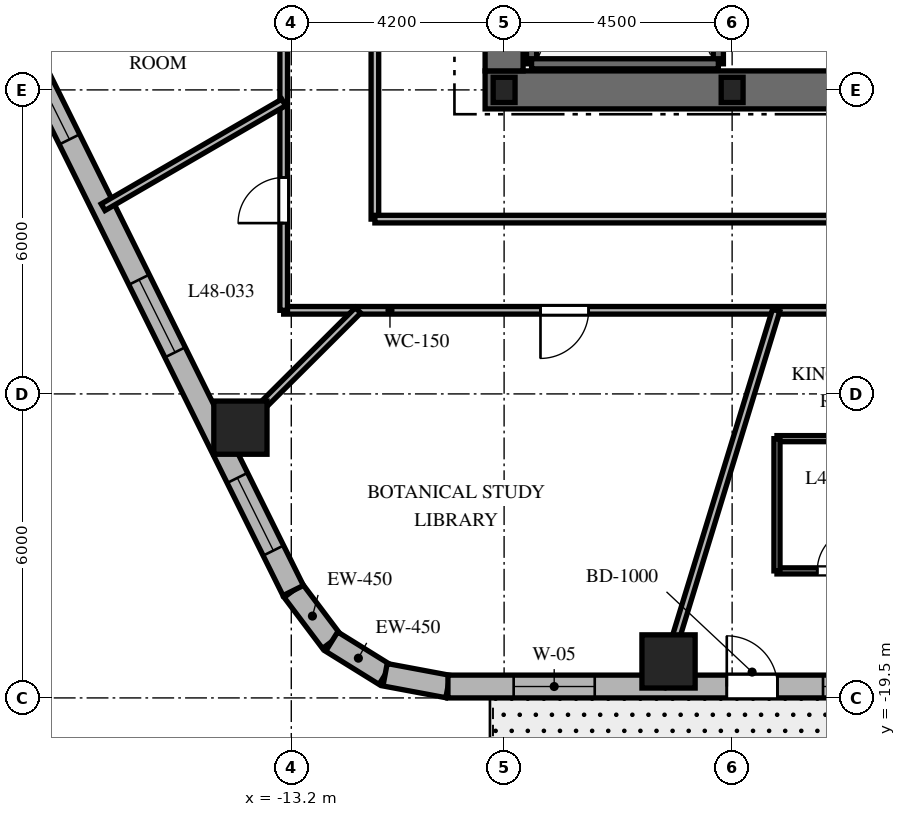
"""IFC4 building model, lengths in metres.
Left out: names, types, materials, properties, quantities, classifications, styles, units other than length and angle.
Written with IfcOpenShell. Run it as: python <this file> out.ifc"""

import sys

from ifc_helpers import new_model, si_unit, direction, frame, frame_2d, origin, origin_2d, place, context, subcontext, project, spatial, rectangle, i_section, extrude, element, fill, save


model = new_model("IFC4")
c1 = context("Model", 3, precision=1e-05, world=origin(), true_north=direction((0.0, 1.0)))
c2 = subcontext(c1, "Body", "Model", "MODEL_VIEW")
j1 = project(units=[si_unit("LENGTHUNIT", "METRE"), si_unit("PLANEANGLEUNIT", "RADIAN")], contexts=[c1])
p1 = place(None, origin())
s1 = spatial("IfcSite", under=j1, at=p1, CompositionType="ELEMENT")
p2 = place(p1, origin())
s2 = spatial("IfcBuilding", under=s1, at=p2, CompositionType="ELEMENT")
p3 = place(p2, frame((0.0, 0.0, 194.1)))
s3 = spatial("IfcBuildingStorey", under=s2, at=p3, CompositionType="ELEMENT", Elevation=194.1)
p4 = place(p3, frame((-9.375, -7.5, 0.0), z_axis=(0.0, 0.0, 1.0), x_axis=(1.0, 0.0, 0.0)))
e1 = element("IfcWall", 1, at=p4, inside=s3, PredefinedType="SHEAR", context=c2, shape_type="SweptSolid", body=[
    extrude(rectangle(XDim=18.75, YDim=0.75, at=frame_2d((9.375, 0.0))), origin(), (0.0, 0.0, 1.0), 3.7),
])
p5 = place(p4, frame((9.425, 0.0, 0.0)))
e2 = element("IfcOpeningElement", 2, at=p5, cuts=e1, PredefinedType="OPENING", context=c2, shape_type="SweptSolid", body=[
    extrude(rectangle(XDim=1.0, YDim=2.15, at=frame_2d((0.5, 1.075))), frame((0.0, 0.385, 0.0), z_axis=(0.0, -1.0, 0.0), x_axis=(1.0, 0.0, 0.0)), (0.0, 0.0, 1.0), 0.77),
])
p6 = place(p3, frame((-9.0, -7.125, 0.0), z_axis=(0.0, 0.0, 1.0), x_axis=(0.0, 1.0, 0.0)))
e3 = element("IfcWall", 3, at=p6, inside=s3, PredefinedType="SHEAR", context=c2, shape_type="SweptSolid", body=[
    extrude(rectangle(XDim=14.25, YDim=0.75, at=frame_2d((7.125, 0.0))), origin(), (0.0, 0.0, 1.0), 3.7),
])
p7 = place(p6, frame((10.25, 0.0, 0.0)))
e4 = element("IfcOpeningElement", 4, at=p7, cuts=e3, PredefinedType="OPENING", context=c2, shape_type="SweptSolid", body=[
    extrude(rectangle(XDim=1.05, YDim=2.15, at=frame_2d((0.525, 1.075))), frame((0.0, 0.385, 0.0), z_axis=(0.0, -1.0, 0.0), x_axis=(1.0, 0.0, 0.0)), (0.0, 0.0, 1.0), 0.77),
])
for number, where, z_axis, x_axis in (
    (5, (-8.458, -6.985, 0.0), (0.0, 0.0, 1.0), (0.0, 1.0, 0.0)),
    (6, (-4.772, -6.985, 0.0), (0.0, 0.0, 1.0), (0.0, 1.0, 0.0)),
):
    element("IfcWall", number, at=place(p3, frame(where, z_axis=z_axis, x_axis=x_axis)), inside=s3, PredefinedType="SHEAR", context=c2, shape_type="SweptSolid", body=[
        extrude(rectangle(XDim=9.143, YDim=0.2, at=frame_2d((4.572, 0.0))), origin(), (0.0, 0.0, 1.0), 3.7),
    ])
p8 = place(p3, frame((-8.458, -6.985, 0.0), z_axis=(0.0, 0.0, 1.0), x_axis=(1.0, 0.0, 0.0)))
e7 = element("IfcWall", 7, at=p8, inside=s3, PredefinedType="SHEAR", context=c2, shape_type="SweptSolid", body=[
    extrude(rectangle(XDim=3.686, YDim=0.2, at=frame_2d((1.843, 0.0))), origin(), (0.0, 0.0, 1.0), 3.7),
])
for number, where, z_axis, x_axis in (
    (8, (-9.0, -7.5, 0.0), (0.0, 0.0, 1.0), (1.0, 0.0, 0.0)),
    (9, (-4.5, -7.5, 0.0), (0.0, 0.0, 1.0), (1.0, 0.0, 0.0)),
):
    element("IfcColumn", number, at=place(p3, frame(where, z_axis=z_axis, x_axis=x_axis)), inside=s3, PredefinedType="COLUMN", context=c2, shape_type="SweptSolid", body=[
        extrude(i_section(OverallWidth=0.432, OverallDepth=0.498, WebThickness=0.056, FlangeThickness=0.089, at=origin_2d()), origin(), (0.0, 0.0, 1.0), 3.7),
    ])
for number, where, z_axis, x_axis in (
    (10, (-5.755, -18.78, 0.0), (0.0, 0.0, 1.0), (1.0, 0.0, 0.0)),
    (11, (-14.204, -14.166, 0.0), (0.0, 0.0, 1.0), (1.0, 0.0, 0.0)),
):
    element("IfcColumn", number, at=place(p3, frame(where, z_axis=z_axis, x_axis=x_axis)), inside=s3, PredefinedType="COLUMN", context=c2, shape_type="SweptSolid", body=[
        extrude(rectangle(XDim=1.05, YDim=1.05, at=origin_2d()), origin(), (0.0, 0.0, 1.0), 3.7),
    ])
p9 = place(p3, frame((-13.162, -17.381, 0.0), z_axis=(0.0, 0.0, 1.0), x_axis=(0.601515770517, -0.798860925205, 0.0)))
e12 = element("IfcWall", 12, at=p9, inside=s3, PredefinedType="SOLIDWALL", context=c2, shape_type="SweptSolid", body=[
    extrude(rectangle(XDim=1.262, YDim=0.45, at=frame_2d((0.631, 0.0))), origin(), (0.0, 0.0, 1.0), 3.4),
])
p10 = place(p3, frame((-12.403, -18.389, 0.0), z_axis=(0.0, 0.0, 1.0), x_axis=(0.849795170926, -0.527113049991, 0.0)))
e13 = element("IfcWall", 13, at=p10, inside=s3, PredefinedType="SOLIDWALL", context=c2, shape_type="SweptSolid", body=[
    extrude(rectangle(XDim=1.241, YDim=0.45, at=frame_2d((0.62, 0.0))), origin(), (0.0, 0.0, 1.0), 3.4),
])
p11 = place(p3, frame((-11.349, -19.043, 0.0), z_axis=(0.0, 0.0, 1.0), x_axis=(0.982931267051, -0.183973161772, 0.0)))
e14 = element("IfcWall", 14, at=p11, inside=s3, PredefinedType="SOLIDWALL", context=c2, shape_type="SweptSolid", body=[
    extrude(rectangle(XDim=1.262, YDim=0.45, at=frame_2d((0.631, 0.0))), origin(), (0.0, 0.0, 1.0), 3.4),
])
p12 = place(p3, frame((-10.108, -19.275, 0.0), z_axis=(0.0, 0.0, 1.0), x_axis=(1.0, 0.0, 0.0)))
e15 = element("IfcWall", 15, at=p12, inside=s3, PredefinedType="SOLIDWALL", context=c2, shape_type="SweptSolid", body=[
    extrude(rectangle(XDim=21.829, YDim=0.45, at=frame_2d((10.915, 0.0))), origin(), (0.0, 0.0, 1.0), 3.4),
])
p13 = place(p12, frame((5.503, 0.0, 0.0)))
e16 = element("IfcOpeningElement", 16, at=p13, cuts=e15, PredefinedType="OPENING", context=c2, shape_type="SweptSolid", body=[
    extrude(rectangle(XDim=1.0, YDim=2.15, at=frame_2d((0.5, 1.075))), frame((0.0, 0.235, 0.0), z_axis=(0.0, -1.0, 0.0), x_axis=(1.0, 0.0, 0.0)), (0.0, 0.0, 1.0), 0.47),
])
p14 = place(p12, frame((1.297, 0.0, 0.8)))
e17 = element("IfcOpeningElement", 17, at=p14, cuts=e15, PredefinedType="OPENING", context=c2, shape_type="SweptSolid", body=[
    extrude(rectangle(XDim=1.6, YDim=1.75, at=frame_2d((0.8, 0.875))), frame((0.0, 0.235, 0.0), z_axis=(0.0, -1.0, 0.0), x_axis=(1.0, 0.0, 0.0)), (0.0, 0.0, 1.0), 0.47),
])
p15 = place(p12, frame((7.402, 0.0, 0.8)))
e18 = element("IfcOpeningElement", 18, at=p15, cuts=e15, PredefinedType="OPENING", context=c2, shape_type="SweptSolid", body=[
    extrude(rectangle(XDim=1.6, YDim=1.75, at=frame_2d((0.8, 0.875))), frame((0.0, 0.235, 0.0), z_axis=(0.0, -1.0, 0.0), x_axis=(1.0, 0.0, 0.0)), (0.0, 0.0, 1.0), 0.47),
])
p16 = place(p12, frame((12.684, 0.0, 0.8)))
e19 = element("IfcOpeningElement", 19, at=p16, cuts=e15, PredefinedType="OPENING", context=c2, shape_type="SweptSolid", body=[
    extrude(rectangle(XDim=1.6, YDim=1.75, at=frame_2d((0.8, 0.875))), frame((0.0, 0.235, 0.0), z_axis=(0.0, -1.0, 0.0), x_axis=(1.0, 0.0, 0.0)), (0.0, 0.0, 1.0), 0.47),
])
p17 = place(p12, frame((18.933, 0.0, 0.8)))
e20 = element("IfcOpeningElement", 20, at=p17, cuts=e15, PredefinedType="OPENING", context=c2, shape_type="SweptSolid", body=[
    extrude(rectangle(XDim=1.6, YDim=1.75, at=frame_2d((0.8, 0.875))), frame((0.0, 0.235, 0.0), z_axis=(0.0, -1.0, 0.0), x_axis=(1.0, 0.0, 0.0)), (0.0, 0.0, 1.0), 0.47),
])
p18 = place(p3, frame((-20.618, -2.344, 0.0), z_axis=(0.0, 0.0, 1.0), x_axis=(0.444243691097, -0.895905990002, 0.0)))
e21 = element("IfcWall", 21, at=p18, inside=s3, PredefinedType="SOLIDWALL", context=c2, shape_type="SweptSolid", body=[
    extrude(rectangle(XDim=16.784, YDim=0.45, at=frame_2d((8.392, 0.0))), origin(), (0.0, 0.0, 1.0), 3.4),
])
p19 = place(p18, frame((0.931, 0.0, 0.8)))
e22 = element("IfcOpeningElement", 22, at=p19, cuts=e21, PredefinedType="OPENING", context=c2, shape_type="SweptSolid", body=[
    extrude(rectangle(XDim=1.6, YDim=1.75, at=frame_2d((0.8, 0.875))), frame((0.0, 0.235, 0.0), z_axis=(0.0, -1.0, 0.0), x_axis=(1.0, 0.0, 0.0)), (0.0, 0.0, 1.0), 0.47),
])
p20 = place(p18, frame((5.245, 0.0, 0.8)))
e23 = element("IfcOpeningElement", 23, at=p20, cuts=e21, PredefinedType="OPENING", context=c2, shape_type="SweptSolid", body=[
    extrude(rectangle(XDim=1.6, YDim=1.75, at=frame_2d((0.8, 0.875))), frame((0.0, 0.235, 0.0), z_axis=(0.0, -1.0, 0.0), x_axis=(1.0, 0.0, 0.0)), (0.0, 0.0, 1.0), 0.47),
])
p21 = place(p18, frame((9.936, 0.0, 0.8)))
e24 = element("IfcOpeningElement", 24, at=p21, cuts=e21, PredefinedType="OPENING", context=c2, shape_type="SweptSolid", body=[
    extrude(rectangle(XDim=1.6, YDim=1.75, at=frame_2d((0.8, 0.875))), frame((0.0, 0.235, 0.0), z_axis=(0.0, -1.0, 0.0), x_axis=(1.0, 0.0, 0.0)), (0.0, 0.0, 1.0), 0.47),
])
p22 = place(p18, frame((14.303, 0.0, 0.8)))
e25 = element("IfcOpeningElement", 25, at=p22, cuts=e21, PredefinedType="OPENING", context=c2, shape_type="SweptSolid", body=[
    extrude(rectangle(XDim=1.6, YDim=1.75, at=frame_2d((0.8, 0.875))), frame((0.0, 0.235, 0.0), z_axis=(0.0, -1.0, 0.0), x_axis=(1.0, 0.0, 0.0)), (0.0, 0.0, 1.0), 0.47),
])
p23 = place(p3, frame((13.35, -11.85, 0.0), z_axis=(0.0, 0.0, 1.0), x_axis=(-1.0, 0.0, 0.0)))
e26 = element("IfcWall", 26, at=p23, inside=s3, PredefinedType="PARTITIONING", context=c2, shape_type="SweptSolid", body=[
    extrude(rectangle(XDim=26.7, YDim=0.15, at=frame_2d((13.35, 0.0))), origin(), (0.0, 0.0, 1.0), 2.84),
])
p24 = place(p23, frame((20.682, 0.0, 0.0)))
e27 = element("IfcOpeningElement", 27, at=p24, cuts=e26, PredefinedType="OPENING", context=c2, shape_type="SweptSolid", body=[
    extrude(rectangle(XDim=0.95, YDim=2.03, at=frame_2d((0.475, 1.015))), frame((0.0, 0.085, 0.0), z_axis=(0.0, -1.0, 0.0), x_axis=(1.0, 0.0, 0.0)), (0.0, 0.0, 1.0), 0.17),
])
p25 = place(p23, frame((14.708, 0.0, 0.0)))
e28 = element("IfcOpeningElement", 28, at=p25, cuts=e26, PredefinedType="OPENING", context=c2, shape_type="SweptSolid", body=[
    extrude(rectangle(XDim=0.95, YDim=2.03, at=frame_2d((0.475, 1.015))), frame((0.0, 0.085, 0.0), z_axis=(0.0, -1.0, 0.0), x_axis=(1.0, 0.0, 0.0)), (0.0, 0.0, 1.0), 0.17),
])
p26 = place(p23, frame((10.553, 0.0, 0.0)))
e29 = element("IfcOpeningElement", 29, at=p26, cuts=e26, PredefinedType="OPENING", context=c2, shape_type="SweptSolid", body=[
    extrude(rectangle(XDim=0.95, YDim=2.03, at=frame_2d((0.475, 1.015))), frame((0.0, 0.085, 0.0), z_axis=(0.0, -1.0, 0.0), x_axis=(1.0, 0.0, 0.0)), (0.0, 0.0, 1.0), 0.17),
])
p27 = place(p23, frame((3.97, 0.0, 0.0)))
e30 = element("IfcOpeningElement", 30, at=p27, cuts=e26, PredefinedType="OPENING", context=c2, shape_type="SweptSolid", body=[
    extrude(rectangle(XDim=1.0, YDim=2.03, at=frame_2d((0.5, 1.015))), frame((0.0, 0.085, 0.0), z_axis=(0.0, -1.0, 0.0), x_axis=(1.0, 0.0, 0.0)), (0.0, 0.0, 1.0), 0.17),
])
p28 = place(p3, frame((-13.35, -11.85, 0.0), z_axis=(0.0, 0.0, 1.0), x_axis=(0.0, 1.0, 0.0)))
e31 = element("IfcWall", 31, at=p28, inside=s3, PredefinedType="PARTITIONING", context=c2, shape_type="SweptSolid", body=[
    extrude(rectangle(XDim=23.7, YDim=0.15, at=frame_2d((11.85, 0.0))), origin(), (0.0, 0.0, 1.0), 2.84),
])
p29 = place(p28, frame((20.136, 0.0, 0.0)))
e32 = element("IfcOpeningElement", 32, at=p29, cuts=e31, PredefinedType="OPENING", context=c2, shape_type="SweptSolid", body=[
    extrude(rectangle(XDim=0.9, YDim=2.03, at=frame_2d((0.45, 1.015))), frame((0.0, 0.085, 0.0), z_axis=(0.0, -1.0, 0.0), x_axis=(1.0, 0.0, 0.0)), (0.0, 0.0, 1.0), 0.17),
])
p30 = place(p28, frame((15.551, 0.0, 0.0)))
e33 = element("IfcOpeningElement", 33, at=p30, cuts=e31, PredefinedType="OPENING", context=c2, shape_type="SweptSolid", body=[
    extrude(rectangle(XDim=0.9, YDim=2.03, at=frame_2d((0.45, 1.015))), frame((0.0, 0.085, 0.0), z_axis=(0.0, -1.0, 0.0), x_axis=(1.0, 0.0, 0.0)), (0.0, 0.0, 1.0), 0.17),
])
p31 = place(p28, frame((10.751, 0.0, 0.0)))
e34 = element("IfcOpeningElement", 34, at=p31, cuts=e31, PredefinedType="OPENING", context=c2, shape_type="SweptSolid", body=[
    extrude(rectangle(XDim=0.95, YDim=2.03, at=frame_2d((0.475, 1.015))), frame((0.0, 0.085, 0.0), z_axis=(0.0, -1.0, 0.0), x_axis=(1.0, 0.0, 0.0)), (0.0, 0.0, 1.0), 0.17),
])
p32 = place(p28, frame((5.677, 0.0, 0.0)))
e35 = element("IfcOpeningElement", 35, at=p32, cuts=e31, PredefinedType="OPENING", context=c2, shape_type="SweptSolid", body=[
    extrude(rectangle(XDim=0.9, YDim=2.03, at=frame_2d((0.45, 1.015))), frame((0.0, 0.085, 0.0), z_axis=(0.0, -1.0, 0.0), x_axis=(1.0, 0.0, 0.0)), (0.0, 0.0, 1.0), 0.17),
])
p33 = place(p28, frame((1.721, 0.0, 0.0)))
e36 = element("IfcOpeningElement", 36, at=p33, cuts=e31, PredefinedType="OPENING", context=c2, shape_type="SweptSolid", body=[
    extrude(rectangle(XDim=0.9, YDim=2.03, at=frame_2d((0.45, 1.015))), frame((0.0, 0.085, 0.0), z_axis=(0.0, -1.0, 0.0), x_axis=(1.0, 0.0, 0.0)), (0.0, 0.0, 1.0), 0.17),
])
p34 = place(p3, frame((-11.55, 2.7, 0.0), z_axis=(0.0, 0.0, 1.0), x_axis=(0.0, -1.0, 0.0)))
e37 = element("IfcWall", 37, at=p34, inside=s3, PredefinedType="PARTITIONING", context=c2, shape_type="SweptSolid", body=[
    extrude(rectangle(XDim=12.75, YDim=0.15, at=frame_2d((6.375, 0.0))), origin(), (0.0, 0.0, 1.0), 2.84),
])
p35 = place(p3, frame((-11.55, -10.05, 0.0), z_axis=(0.0, 0.0, 1.0), x_axis=(1.0, 0.0, 0.0)))
e38 = element("IfcWall", 38, at=p35, inside=s3, PredefinedType="PARTITIONING", context=c2, shape_type="SweptSolid", body=[
    extrude(rectangle(XDim=11.55, YDim=0.15, at=frame_2d((5.775, 0.0))), origin(), (0.0, 0.0, 1.0), 2.84),
])
p36 = place(p3, frame((-13.35, -7.748, 0.0), z_axis=(0.0, 0.0, 1.0), x_axis=(-0.864894342526, -0.501953958313, 0.0)))
e39 = element("IfcWall", 39, at=p36, inside=s3, PredefinedType="PARTITIONING", context=c2, shape_type="SweptSolid", body=[
    extrude(rectangle(XDim=4.12, YDim=0.15, at=frame_2d((2.06, 0.0))), origin(), (0.0, 0.0, 1.0), 2.64),
])
p37 = place(p3, frame((-11.882, -11.85, 0.0), z_axis=(0.0, 0.0, 1.0), x_axis=(-0.708037373639, -0.706174962407, 0.0)))
e40 = element("IfcWall", 40, at=p37, inside=s3, PredefinedType="PARTITIONING", context=c2, shape_type="SweptSolid", body=[
    extrude(rectangle(XDim=3.802, YDim=0.15, at=frame_2d((1.901, 0.0))), origin(), (0.0, 0.0, 1.0), 2.64),
])
p38 = place(p3, frame((-3.631, -11.85, 0.0), z_axis=(0.0, 0.0, 1.0), x_axis=(-0.293007573338, -0.956110120209, 0.0)))
e41 = element("IfcWall", 41, at=p38, inside=s3, PredefinedType="PARTITIONING", context=c2, shape_type="SweptSolid", body=[
    extrude(rectangle(XDim=7.766, YDim=0.15, at=frame_2d((3.883, 0.0))), origin(), (0.0, 0.0, 1.0), 2.64),
])
p39 = place(p3, frame((-3.615, -16.993, 0.0), z_axis=(0.0, 0.0, 1.0), x_axis=(1.0, 0.0, 0.0)))
e42 = element("IfcWall", 42, at=p39, inside=s3, PredefinedType="PARTITIONING", context=c2, shape_type="SweptSolid", body=[
    extrude(rectangle(XDim=2.44, YDim=0.12, at=frame_2d((1.22, 0.0))), origin(), (0.0, 0.0, 1.0), 3.4),
])
p40 = place(p39, frame((0.795, 0.0, 0.0)))
e43 = element("IfcOpeningElement", 43, at=p40, cuts=e42, PredefinedType="OPENING", context=c2, shape_type="SweptSolid", body=[
    extrude(rectangle(XDim=0.85, YDim=2.03, at=frame_2d((0.425, 1.015))), frame((0.0, 0.07, 0.0), z_axis=(0.0, -1.0, 0.0), x_axis=(1.0, 0.0, 0.0)), (0.0, 0.0, 1.0), 0.14),
])
p41 = place(p3, frame((-1.175, -14.383, 0.0), z_axis=(0.0, 0.0, 1.0), x_axis=(-1.0, 0.0, 0.0)))
e44 = element("IfcWall", 44, at=p41, inside=s3, PredefinedType="PARTITIONING", context=c2, shape_type="SweptSolid", body=[
    extrude(rectangle(XDim=2.44, YDim=0.12, at=frame_2d((1.22, 0.0))), origin(), (0.0, 0.0, 1.0), 3.4),
])
p42 = place(p3, frame((-3.615, -14.383, 0.0), z_axis=(0.0, 0.0, 1.0), x_axis=(0.0, -1.0, 0.0)))
e45 = element("IfcWall", 45, at=p42, inside=s3, PredefinedType="PARTITIONING", context=c2, shape_type="SweptSolid", body=[
    extrude(rectangle(XDim=2.61, YDim=0.12, at=frame_2d((1.305, 0.0))), origin(), (0.0, 0.0, 1.0), 2.84),
])
p43 = place(p13, origin())
e46 = element("IfcDoor", 46, at=p43, inside=s3, OperationType="SINGLE_SWING_LEFT", PredefinedType="DOOR", context=c2, shape_type="SweptSolid", body=[
    extrude(rectangle(XDim=1.0, YDim=2.15, at=frame_2d((0.5, 1.075))), frame((0.0, 0.025, 0.0), z_axis=(0.0, -1.0, 0.0), x_axis=(1.0, 0.0, 0.0)), (0.0, 0.0, 1.0), 0.05),
])
fill(e16, e46)
p44 = place(p14, origin())
e47 = element("IfcWindow", 47, at=p44, inside=s3, PartitioningType="SINGLE_PANEL", PredefinedType="WINDOW", context=c2, shape_type="SweptSolid", body=[
    extrude(rectangle(XDim=1.6, YDim=1.75, at=frame_2d((0.8, 0.875))), frame((0.0, 0.03, 0.0), z_axis=(0.0, -1.0, 0.0), x_axis=(1.0, 0.0, 0.0)), (0.0, 0.0, 1.0), 0.06),
])
fill(e17, e47)
p45 = place(p15, origin())
e48 = element("IfcWindow", 48, at=p45, inside=s3, PartitioningType="SINGLE_PANEL", PredefinedType="WINDOW", context=c2, shape_type="SweptSolid", body=[
    extrude(rectangle(XDim=1.6, YDim=1.75, at=frame_2d((0.8, 0.875))), frame((0.0, 0.03, 0.0), z_axis=(0.0, -1.0, 0.0), x_axis=(1.0, 0.0, 0.0)), (0.0, 0.0, 1.0), 0.06),
])
fill(e18, e48)
p46 = place(p20, origin())
e49 = element("IfcWindow", 49, at=p46, inside=s3, PartitioningType="SINGLE_PANEL", PredefinedType="WINDOW", context=c2, shape_type="SweptSolid", body=[
    extrude(rectangle(XDim=1.6, YDim=1.75, at=frame_2d((0.8, 0.875))), frame((0.0, 0.03, 0.0), z_axis=(0.0, -1.0, 0.0), x_axis=(1.0, 0.0, 0.0)), (0.0, 0.0, 1.0), 0.06),
])
fill(e23, e49)
p47 = place(p21, origin())
e50 = element("IfcWindow", 50, at=p47, inside=s3, PartitioningType="SINGLE_PANEL", PredefinedType="WINDOW", context=c2, shape_type="SweptSolid", body=[
    extrude(rectangle(XDim=1.6, YDim=1.75, at=frame_2d((0.8, 0.875))), frame((0.0, 0.03, 0.0), z_axis=(0.0, -1.0, 0.0), x_axis=(1.0, 0.0, 0.0)), (0.0, 0.0, 1.0), 0.06),
])
fill(e24, e50)
p48 = place(p22, origin())
e51 = element("IfcWindow", 51, at=p48, inside=s3, PartitioningType="SINGLE_PANEL", PredefinedType="WINDOW", context=c2, shape_type="SweptSolid", body=[
    extrude(rectangle(XDim=1.6, YDim=1.75, at=frame_2d((0.8, 0.875))), frame((0.0, 0.03, 0.0), z_axis=(0.0, -1.0, 0.0), x_axis=(1.0, 0.0, 0.0)), (0.0, 0.0, 1.0), 0.06),
])
fill(e25, e51)
p49 = place(p33, origin())
e52 = element("IfcDoor", 52, at=p49, inside=s3, OperationType="SINGLE_SWING_LEFT", PredefinedType="DOOR", context=c2, shape_type="SweptSolid", body=[
    extrude(rectangle(XDim=0.9, YDim=2.03, at=frame_2d((0.45, 1.015))), frame((0.0, 0.025, 0.0), z_axis=(0.0, -1.0, 0.0), x_axis=(1.0, 0.0, 0.0)), (0.0, 0.0, 1.0), 0.05),
])
fill(e36, e52)
p50 = place(p24, origin())
e53 = element("IfcDoor", 53, at=p50, inside=s3, OperationType="SINGLE_SWING_RIGHT", PredefinedType="DOOR", context=c2, shape_type="SweptSolid", body=[
    extrude(rectangle(XDim=0.95, YDim=2.03, at=frame_2d((0.475, 1.015))), frame((0.0, 0.025, 0.0), z_axis=(0.0, -1.0, 0.0), x_axis=(1.0, 0.0, 0.0)), (0.0, 0.0, 1.0), 0.05),
])
fill(e27, e53)
p51 = place(p40, origin())
e54 = element("IfcDoor", 54, at=p51, inside=s3, OperationType="SINGLE_SWING_RIGHT", PredefinedType="DOOR", context=c2, shape_type="SweptSolid", body=[
    extrude(rectangle(XDim=0.85, YDim=2.03, at=frame_2d((0.425, 1.015))), frame((0.0, 0.025, 0.0), z_axis=(0.0, -1.0, 0.0), x_axis=(1.0, 0.0, 0.0)), (0.0, 0.0, 1.0), 0.05),
])
fill(e43, e54)
save(model, sys.argv[1])
